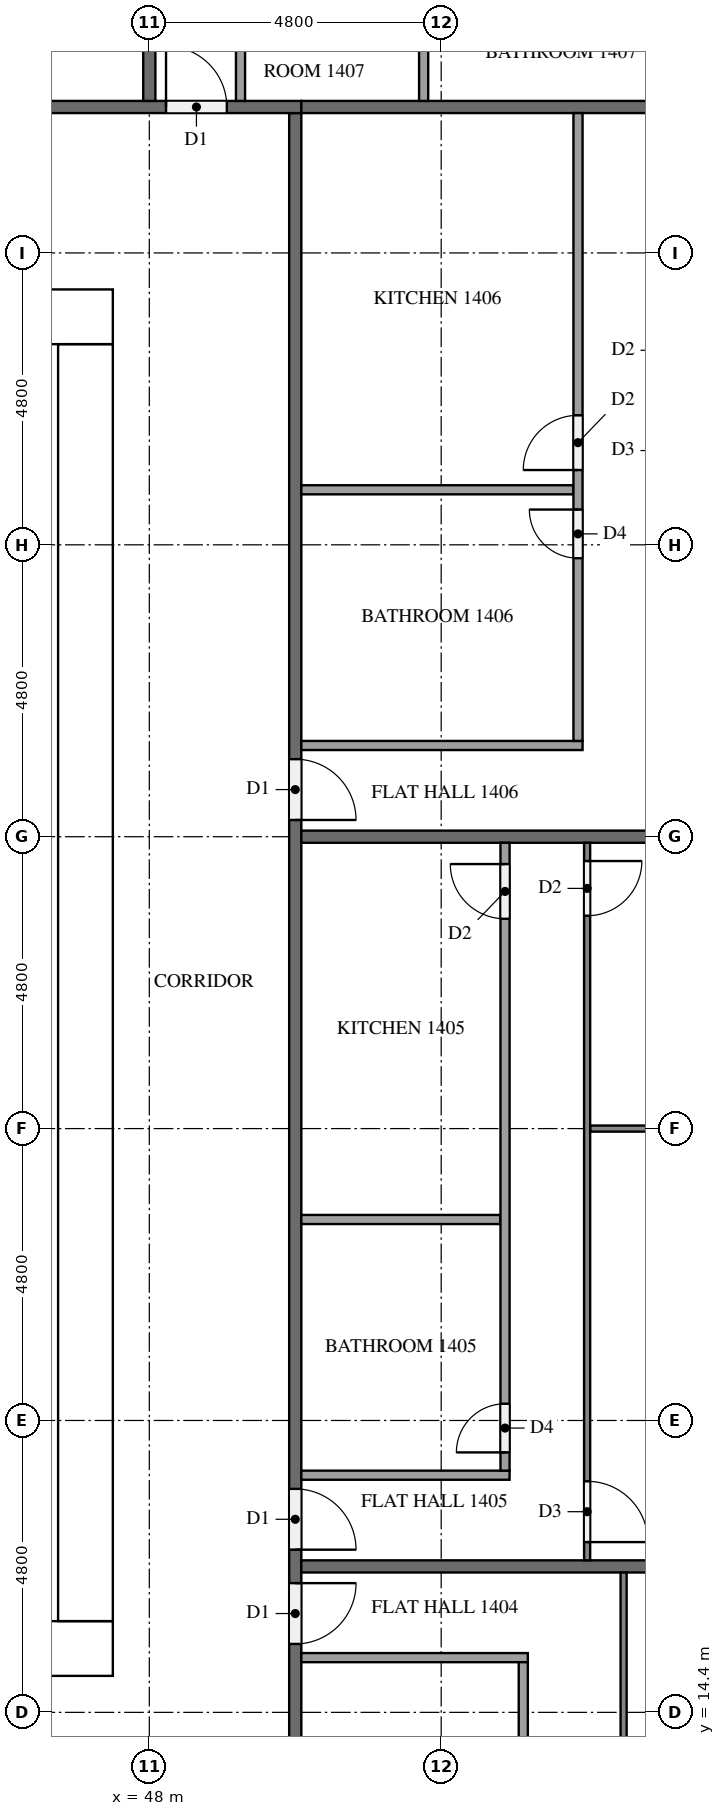
"""IFC4 building model, lengths in metres.
Left out: names, types, materials, properties, quantities, classifications, styles, units other than length and angle.
Written with IfcOpenShell. Run it as: python <this file> out.ifc"""

import sys

from ifc_helpers import new_model, si_unit, direction, frame, frame_2d, origin, place, context, subcontext, project, spatial, rectangle, extrude, element, fill, save


model = new_model("IFC4")
c1 = context("Model", 3, precision=1e-05, world=origin(), true_north=direction((0.0, 1.0)))
c2 = subcontext(c1, "Body", "Model", "MODEL_VIEW")
j1 = project(units=[si_unit("LENGTHUNIT", "METRE"), si_unit("PLANEANGLEUNIT", "RADIAN")], contexts=[c1])
p1 = place(None, origin())
s1 = spatial("IfcSite", under=j1, at=p1, CompositionType="ELEMENT")
p2 = place(p1, origin())
s2 = spatial("IfcBuilding", under=s1, at=p2, CompositionType="ELEMENT")
p3 = place(p2, frame((0.0, 0.0, 59.3)))
s3 = spatial("IfcBuildingStorey", under=s2, at=p3, CompositionType="ELEMENT", Elevation=59.3)
p4 = place(p3, frame((15.0, 15.45, 0.0), z_axis=(0.0, 0.0, 1.0), x_axis=(1.0, 0.0, 0.0)))
e1 = element("IfcWall", 1, at=p4, inside=s3, PredefinedType="SHEAR", context=c2, shape_type="SweptSolid", body=[
    extrude(rectangle(XDim=32.4, YDim=0.9, at=frame_2d((16.2, 0.0))), origin(), (0.0, 0.0, 1.0), 3.2),
])
p5 = place(p4, frame((15.3, 0.0, 0.0)))
e2 = element("IfcOpeningElement", 2, at=p5, cuts=e1, PredefinedType="OPENING", context=c2, shape_type="SweptSolid", body=[
    extrude(rectangle(XDim=1.8, YDim=2.1, at=frame_2d((0.9, 1.05))), frame((0.0, 0.46, 0.0), z_axis=(0.0, -1.0, 0.0), x_axis=(1.0, 0.0, 0.0)), (0.0, 0.0, 1.0), 0.92),
])
p6 = place(p3, frame((15.0, 37.35, 0.0), z_axis=(0.0, 0.0, 1.0), x_axis=(1.0, 0.0, 0.0)))
e3 = element("IfcWall", 3, at=p6, inside=s3, PredefinedType="SHEAR", context=c2, shape_type="SweptSolid", body=[
    extrude(rectangle(XDim=32.4, YDim=0.9, at=frame_2d((16.2, 0.0))), origin(), (0.0, 0.0, 1.0), 3.2),
])
p7 = place(p6, frame((15.3, 0.0, 0.0)))
e4 = element("IfcOpeningElement", 4, at=p7, cuts=e3, PredefinedType="OPENING", context=c2, shape_type="SweptSolid", body=[
    extrude(rectangle(XDim=1.8, YDim=2.1, at=frame_2d((0.9, 1.05))), frame((0.0, 0.46, 0.0), z_axis=(0.0, -1.0, 0.0), x_axis=(1.0, 0.0, 0.0)), (0.0, 0.0, 1.0), 0.92),
])
p8 = place(p6, frame((1.794, 0.0, 0.0)))
e5 = element("IfcOpeningElement", 5, at=p8, cuts=e3, PredefinedType="OPENING", context=c2, shape_type="SweptSolid", body=[
    extrude(rectangle(XDim=1.0, YDim=2.1, at=frame_2d((0.5, 1.05))), frame((0.0, 0.46, 0.0), z_axis=(0.0, -1.0, 0.0), x_axis=(1.0, 0.0, 0.0)), (0.0, 0.0, 1.0), 0.92),
])
p9 = place(p6, frame((5.331, 0.0, 0.0)))
e6 = element("IfcOpeningElement", 6, at=p9, cuts=e3, PredefinedType="OPENING", context=c2, shape_type="SweptSolid", body=[
    extrude(rectangle(XDim=1.0, YDim=2.1, at=frame_2d((0.5, 1.05))), frame((0.0, 0.46, 0.0), z_axis=(0.0, -1.0, 0.0), x_axis=(1.0, 0.0, 0.0)), (0.0, 0.0, 1.0), 0.92),
])
p10 = place(p3, frame((46.95, 15.9, 0.0), z_axis=(0.0, 0.0, 1.0), x_axis=(0.0, 1.0, 0.0)))
e7 = element("IfcWall", 7, at=p10, inside=s3, PredefinedType="SHEAR", context=c2, shape_type="SweptSolid", body=[
    extrude(rectangle(XDim=21.0, YDim=0.9, at=frame_2d((10.5, 0.0))), origin(), (0.0, 0.0, 1.0), 3.2),
])
p11 = place(p10, frame((10.2, 0.0, 0.0)))
e8 = element("IfcOpeningElement", 8, at=p11, cuts=e7, PredefinedType="OPENING", context=c2, shape_type="SweptSolid", body=[
    extrude(rectangle(XDim=1.2, YDim=2.1, at=frame_2d((0.6, 1.05))), frame((0.0, 0.46, 0.0), z_axis=(0.0, -1.0, 0.0), x_axis=(1.0, 0.0, 0.0)), (0.0, 0.0, 1.0), 0.92),
])
p12 = place(p3, frame((50.4, 40.7, 0.0), z_axis=(0.0, 0.0, 1.0), x_axis=(0.0, -1.0, 0.0)))
e9 = element("IfcWall", 9, at=p12, inside=s3, PredefinedType="PARTITIONING", context=c2, shape_type="SweptSolid", body=[
    extrude(rectangle(XDim=28.6, YDim=0.2, at=frame_2d((14.3, 0.0))), origin(), (0.0, 0.0, 1.0), 3.2),
])
p13 = place(p12, frame((24.175, 0.0, 0.0)))
e10 = element("IfcOpeningElement", 10, at=p13, cuts=e9, PredefinedType="OPENING", context=c2, shape_type="SweptSolid", body=[
    extrude(rectangle(XDim=1.0, YDim=2.1, at=frame_2d((0.5, 1.05))), frame((0.0, 0.11, 0.0), z_axis=(0.0, -1.0, 0.0), x_axis=(1.0, 0.0, 0.0)), (0.0, 0.0, 1.0), 0.22),
])
p14 = place(p12, frame((22.625, 0.0, 0.0)))
e11 = element("IfcOpeningElement", 11, at=p14, cuts=e9, PredefinedType="OPENING", context=c2, shape_type="SweptSolid", body=[
    extrude(rectangle(XDim=1.0, YDim=2.1, at=frame_2d((0.5, 1.05))), frame((0.0, 0.11, 0.0), z_axis=(0.0, -1.0, 0.0), x_axis=(1.0, 0.0, 0.0)), (0.0, 0.0, 1.0), 0.22),
])
p15 = place(p12, frame((10.625, 0.0, 0.0)))
e12 = element("IfcOpeningElement", 12, at=p15, cuts=e9, PredefinedType="OPENING", context=c2, shape_type="SweptSolid", body=[
    extrude(rectangle(XDim=1.0, YDim=2.1, at=frame_2d((0.5, 1.05))), frame((0.0, 0.11, 0.0), z_axis=(0.0, -1.0, 0.0), x_axis=(1.0, 0.0, 0.0)), (0.0, 0.0, 1.0), 0.22),
])
p16 = place(p3, frame((11.9, 40.8, 0.0), z_axis=(0.0, 0.0, 1.0), x_axis=(1.0, 0.0, 0.0)))
e13 = element("IfcWall", 13, at=p16, inside=s3, PredefinedType="PARTITIONING", context=c2, shape_type="SweptSolid", body=[
    extrude(rectangle(XDim=38.6, YDim=0.2, at=frame_2d((19.3, 0.0))), origin(), (0.0, 0.0, 1.0), 3.2),
])
p17 = place(p16, frame((36.375, 0.0, 0.0)))
e14 = element("IfcOpeningElement", 14, at=p17, cuts=e13, PredefinedType="OPENING", context=c2, shape_type="SweptSolid", body=[
    extrude(rectangle(XDim=1.0, YDim=2.1, at=frame_2d((0.5, 1.05))), frame((0.0, 0.11, 0.0), z_axis=(0.0, -1.0, 0.0), x_axis=(1.0, 0.0, 0.0)), (0.0, 0.0, 1.0), 0.22),
])
p18 = place(p16, frame((17.125, 0.0, 0.0)))
e15 = element("IfcOpeningElement", 15, at=p18, cuts=e13, PredefinedType="OPENING", context=c2, shape_type="SweptSolid", body=[
    extrude(rectangle(XDim=1.1, YDim=2.1, at=frame_2d((0.55, 1.05))), frame((0.0, 0.11, 0.0), z_axis=(0.0, -1.0, 0.0), x_axis=(1.0, 0.0, 0.0)), (0.0, 0.0, 1.0), 0.22),
])
p19 = place(p16, frame((15.625, 0.0, 0.0)))
e16 = element("IfcOpeningElement", 16, at=p19, cuts=e13, PredefinedType="OPENING", context=c2, shape_type="SweptSolid", body=[
    extrude(rectangle(XDim=1.0, YDim=2.1, at=frame_2d((0.5, 1.05))), frame((0.0, 0.11, 0.0), z_axis=(0.0, -1.0, 0.0), x_axis=(1.0, 0.0, 0.0)), (0.0, 0.0, 1.0), 0.22),
])
p20 = place(p16, frame((1.225, 0.0, 0.0)))
e17 = element("IfcOpeningElement", 17, at=p20, cuts=e13, PredefinedType="OPENING", context=c2, shape_type="SweptSolid", body=[
    extrude(rectangle(XDim=1.0, YDim=2.1, at=frame_2d((0.5, 1.05))), frame((0.0, 0.11, 0.0), z_axis=(0.0, -1.0, 0.0), x_axis=(1.0, 0.0, 0.0)), (0.0, 0.0, 1.0), 0.22),
])
for number, where, z_axis, x_axis in (
    (18, (50.5, 16.8, 0.0), (0.0, 0.0, 1.0), (1.0, 0.0, 0.0)),
    (19, (50.5, 28.8, 0.0), (0.0, 0.0, 1.0), (1.0, 0.0, 0.0)),
    (20, (50.5, 40.8, 0.0), (0.0, 0.0, 1.0), (1.0, 0.0, 0.0)),
):
    element("IfcWall", number, at=place(p3, frame(where, z_axis=z_axis, x_axis=x_axis)), inside=s3, PredefinedType="PARTITIONING", context=c2, shape_type="SweptSolid", body=[
        extrude(rectangle(XDim=11.8, YDim=0.2, at=frame_2d((5.9, 0.0))), origin(), (0.0, 0.0, 1.0), 3.2),
    ])
p21 = place(p3, frame((48.0, 47.575, 0.0), z_axis=(0.0, 0.0, 1.0), x_axis=(0.0, -1.0, 0.0)))
e21 = element("IfcWall", 21, at=p21, inside=s3, PredefinedType="PARTITIONING", context=c2, shape_type="SweptSolid", body=[
    extrude(rectangle(XDim=6.675, YDim=0.2, at=frame_2d((3.337, 0.0))), origin(), (0.0, 0.0, 1.0), 3.2),
])
p22 = place(p3, frame((55.8, 16.7, 0.0), z_axis=(0.0, 0.0, 1.0), x_axis=(0.0, -1.0, 0.0)))
e22 = element("IfcWall", 22, at=p22, inside=s3, PredefinedType="PARTITIONING", context=c2, shape_type="SweptSolid", body=[
    extrude(rectangle(XDim=16.6, YDim=0.1, at=frame_2d((8.3, 0.0))), origin(), (0.0, 0.0, 1.0), 3.2),
])
p23 = place(p22, frame((5.75, 0.0, 0.0)))
e23 = element("IfcOpeningElement", 23, at=p23, cuts=e22, PredefinedType="OPENING", context=c2, shape_type="SweptSolid", body=[
    extrude(rectangle(XDim=1.0, YDim=2.1, at=frame_2d((0.5, 1.05))), frame((0.0, 0.06, 0.0), z_axis=(0.0, -1.0, 0.0), x_axis=(1.0, 0.0, 0.0)), (0.0, 0.0, 1.0), 0.12),
])
p24 = place(p22, frame((7.45, 0.0, 0.0)))
e24 = element("IfcOpeningElement", 24, at=p24, cuts=e22, PredefinedType="OPENING", context=c2, shape_type="SweptSolid", body=[
    extrude(rectangle(XDim=0.9, YDim=2.1, at=frame_2d((0.45, 1.05))), frame((0.0, 0.06, 0.0), z_axis=(0.0, -1.0, 0.0), x_axis=(1.0, 0.0, 0.0)), (0.0, 0.0, 1.0), 0.12),
])
p25 = place(p22, frame((15.2, 0.0, 0.0)))
e25 = element("IfcOpeningElement", 25, at=p25, cuts=e22, PredefinedType="OPENING", context=c2, shape_type="SweptSolid", body=[
    extrude(rectangle(XDim=0.9, YDim=2.1, at=frame_2d((0.45, 1.05))), frame((0.0, 0.06, 0.0), z_axis=(0.0, -1.0, 0.0), x_axis=(1.0, 0.0, 0.0)), (0.0, 0.0, 1.0), 0.12),
])
p26 = place(p3, frame((50.5, 15.3, 0.0), z_axis=(0.0, 0.0, 1.0), x_axis=(1.0, 0.0, 0.0)))
e26 = element("IfcWall", 26, at=p26, inside=s3, PredefinedType="PARTITIONING", context=c2, shape_type="SweptSolid", body=[
    extrude(rectangle(XDim=3.725, YDim=0.15, at=frame_2d((1.863, 0.0))), origin(), (0.0, 0.0, 1.0), 3.2),
])
p27 = place(p3, frame((54.15, 0.1, 0.0), z_axis=(0.0, 0.0, 1.0), x_axis=(0.0, 1.0, 0.0)))
e27 = element("IfcWall", 27, at=p27, inside=s3, PredefinedType="PARTITIONING", context=c2, shape_type="SweptSolid", body=[
    extrude(rectangle(XDim=15.125, YDim=0.15, at=frame_2d((7.562, 0.0))), origin(), (0.0, 0.0, 1.0), 3.2),
])
p28 = place(p27, frame((10.796, 0.0, 0.0)))
e28 = element("IfcOpeningElement", 28, at=p28, cuts=e27, PredefinedType="OPENING", context=c2, shape_type="SweptSolid", body=[
    extrude(rectangle(XDim=0.9, YDim=2.1, at=frame_2d((0.45, 1.05))), frame((0.0, 0.085, 0.0), z_axis=(0.0, -1.0, 0.0), x_axis=(1.0, 0.0, 0.0)), (0.0, 0.0, 1.0), 0.17),
])
p29 = place(p27, frame((9.246, 0.0, 0.0)))
e29 = element("IfcOpeningElement", 29, at=p29, cuts=e27, PredefinedType="OPENING", context=c2, shape_type="SweptSolid", body=[
    extrude(rectangle(XDim=0.9, YDim=2.1, at=frame_2d((0.45, 1.05))), frame((0.0, 0.085, 0.0), z_axis=(0.0, -1.0, 0.0), x_axis=(1.0, 0.0, 0.0)), (0.0, 0.0, 1.0), 0.17),
])
p30 = place(p27, frame((0.35, 0.0, 0.0)))
e30 = element("IfcOpeningElement", 30, at=p30, cuts=e27, PredefinedType="OPENING", context=c2, shape_type="SweptSolid", body=[
    extrude(rectangle(XDim=0.8, YDim=2.1, at=frame_2d((0.4, 1.05))), frame((0.0, 0.085, 0.0), z_axis=(0.0, -1.0, 0.0), x_axis=(1.0, 0.0, 0.0)), (0.0, 0.0, 1.0), 0.17),
])
p31 = place(p3, frame((55.25, 24.0, 0.0), z_axis=(0.0, 0.0, 1.0), x_axis=(1.0, 0.0, 0.0)))
e31 = element("IfcWall", 31, at=p31, inside=s3, PredefinedType="PARTITIONING", context=c2, shape_type="SweptSolid", body=[
    extrude(rectangle(XDim=6.725, YDim=0.1, at=frame_2d((3.363, 0.0))), origin(), (0.0, 0.0, 1.0), 3.2),
])
p32 = place(p3, frame((55.2, 28.7, 0.0), z_axis=(0.0, 0.0, 1.0), x_axis=(0.0, -1.0, 0.0)))
e32 = element("IfcWall", 32, at=p32, inside=s3, PredefinedType="PARTITIONING", context=c2, shape_type="SweptSolid", body=[
    extrude(rectangle(XDim=11.8, YDim=0.1, at=frame_2d((5.9, 0.0))), origin(), (0.0, 0.0, 1.0), 3.2),
])
p33 = place(p32, frame((10.5, 0.0, 0.0)))
e33 = element("IfcOpeningElement", 33, at=p33, cuts=e32, PredefinedType="OPENING", context=c2, shape_type="SweptSolid", body=[
    extrude(rectangle(XDim=1.0, YDim=2.1, at=frame_2d((0.5, 1.05))), frame((0.0, 0.06, 0.0), z_axis=(0.0, -1.0, 0.0), x_axis=(1.0, 0.0, 0.0)), (0.0, 0.0, 1.0), 0.12),
])
p34 = place(p32, frame((0.3, 0.0, 0.0)))
e34 = element("IfcOpeningElement", 34, at=p34, cuts=e32, PredefinedType="OPENING", context=c2, shape_type="SweptSolid", body=[
    extrude(rectangle(XDim=0.9, YDim=2.1, at=frame_2d((0.45, 1.05))), frame((0.0, 0.06, 0.0), z_axis=(0.0, -1.0, 0.0), x_axis=(1.0, 0.0, 0.0)), (0.0, 0.0, 1.0), 0.12),
])
p35 = place(p3, frame((50.5, 22.505, 0.0), z_axis=(0.0, 0.0, 1.0), x_axis=(1.0, 0.0, 0.0)))
e35 = element("IfcWall", 35, at=p35, inside=s3, PredefinedType="PARTITIONING", context=c2, shape_type="SweptSolid", body=[
    extrude(rectangle(XDim=3.275, YDim=0.15, at=frame_2d((1.637, 0.0))), origin(), (0.0, 0.0, 1.0), 3.2),
])
p36 = place(p3, frame((50.5, 18.3, 0.0), z_axis=(0.0, 0.0, 1.0), x_axis=(1.0, 0.0, 0.0)))
e36 = element("IfcWall", 36, at=p36, inside=s3, PredefinedType="PARTITIONING", context=c2, shape_type="SweptSolid", body=[
    extrude(rectangle(XDim=3.425, YDim=0.15, at=frame_2d((1.712, 0.0))), origin(), (0.0, 0.0, 1.0), 3.2),
])
p37 = place(p3, frame((53.85, 18.375, 0.0), z_axis=(0.0, 0.0, 1.0), x_axis=(0.0, 1.0, 0.0)))
e37 = element("IfcWall", 37, at=p37, inside=s3, PredefinedType="PARTITIONING", context=c2, shape_type="SweptSolid", body=[
    extrude(rectangle(XDim=10.325, YDim=0.15, at=frame_2d((5.163, 0.0))), origin(), (0.0, 0.0, 1.0), 3.2),
])
p38 = place(p37, frame((0.3, 0.0, 0.0)))
e38 = element("IfcOpeningElement", 38, at=p38, cuts=e37, PredefinedType="OPENING", context=c2, shape_type="SweptSolid", body=[
    extrude(rectangle(XDim=0.8, YDim=2.1, at=frame_2d((0.4, 1.05))), frame((0.0, 0.085, 0.0), z_axis=(0.0, -1.0, 0.0), x_axis=(1.0, 0.0, 0.0)), (0.0, 0.0, 1.0), 0.17),
])
p39 = place(p37, frame((9.075, 0.0, 0.0)))
e39 = element("IfcOpeningElement", 39, at=p39, cuts=e37, PredefinedType="OPENING", context=c2, shape_type="SweptSolid", body=[
    extrude(rectangle(XDim=0.9, YDim=2.1, at=frame_2d((0.45, 1.05))), frame((0.0, 0.085, 0.0), z_axis=(0.0, -1.0, 0.0), x_axis=(1.0, 0.0, 0.0)), (0.0, 0.0, 1.0), 0.17),
])
p40 = place(p3, frame((50.5, 34.505, 0.0), z_axis=(0.0, 0.0, 1.0), x_axis=(1.0, 0.0, 0.0)))
e40 = element("IfcWall", 40, at=p40, inside=s3, PredefinedType="PARTITIONING", context=c2, shape_type="SweptSolid", body=[
    extrude(rectangle(XDim=4.475, YDim=0.15, at=frame_2d((2.238, 0.0))), origin(), (0.0, 0.0, 1.0), 3.2),
])
p41 = place(p3, frame((50.5, 30.3, 0.0), z_axis=(0.0, 0.0, 1.0), x_axis=(1.0, 0.0, 0.0)))
e41 = element("IfcWall", 41, at=p41, inside=s3, PredefinedType="PARTITIONING", context=c2, shape_type="SweptSolid", body=[
    extrude(rectangle(XDim=4.625, YDim=0.15, at=frame_2d((2.312, 0.0))), origin(), (0.0, 0.0, 1.0), 3.2),
])
p42 = place(p3, frame((55.05, 30.375, 0.0), z_axis=(0.0, 0.0, 1.0), x_axis=(0.0, 1.0, 0.0)))
e42 = element("IfcWall", 42, at=p42, inside=s3, PredefinedType="PARTITIONING", context=c2, shape_type="SweptSolid", body=[
    extrude(rectangle(XDim=10.325, YDim=0.15, at=frame_2d((5.163, 0.0))), origin(), (0.0, 0.0, 1.0), 3.2),
])
p43 = place(p42, frame((3.005, 0.0, 0.0)))
e43 = element("IfcOpeningElement", 43, at=p43, cuts=e42, PredefinedType="OPENING", context=c2, shape_type="SweptSolid", body=[
    extrude(rectangle(XDim=0.8, YDim=2.1, at=frame_2d((0.4, 1.05))), frame((0.0, 0.085, 0.0), z_axis=(0.0, -1.0, 0.0), x_axis=(1.0, 0.0, 0.0)), (0.0, 0.0, 1.0), 0.17),
])
p44 = place(p42, frame((4.455, 0.0, 0.0)))
e44 = element("IfcOpeningElement", 44, at=p44, cuts=e42, PredefinedType="OPENING", context=c2, shape_type="SweptSolid", body=[
    extrude(rectangle(XDim=0.9, YDim=2.1, at=frame_2d((0.45, 1.05))), frame((0.0, 0.085, 0.0), z_axis=(0.0, -1.0, 0.0), x_axis=(1.0, 0.0, 0.0)), (0.0, 0.0, 1.0), 0.17),
])
p45 = place(p3, frame((52.511, 40.9, 0.0), z_axis=(0.0, 0.0, 1.0), x_axis=(0.0, 1.0, 0.0)))
e45 = element("IfcWall", 45, at=p45, inside=s3, PredefinedType="PARTITIONING", context=c2, shape_type="SweptSolid", body=[
    extrude(rectangle(XDim=1.775, YDim=0.15, at=frame_2d((0.888, 0.0))), origin(), (0.0, 0.0, 1.0), 3.2),
])
p46 = place(p3, frame((49.5, 40.9, 0.0), z_axis=(0.0, 0.0, 1.0), x_axis=(0.0, 1.0, 0.0)))
e46 = element("IfcWall", 46, at=p46, inside=s3, PredefinedType="PARTITIONING", context=c2, shape_type="SweptSolid", body=[
    extrude(rectangle(XDim=1.925, YDim=0.15, at=frame_2d((0.962, 0.0))), origin(), (0.0, 0.0, 1.0), 3.2),
])
p47 = place(p11, origin())
e47 = element("IfcDoor", 47, at=p47, inside=s3, OperationType="SINGLE_SWING_RIGHT", PredefinedType="DOOR", context=c2, shape_type="SweptSolid", body=[
    extrude(rectangle(XDim=1.2, YDim=2.1, at=frame_2d((0.6, 1.05))), frame((0.0, 0.025, 0.0), z_axis=(0.0, -1.0, 0.0), x_axis=(1.0, 0.0, 0.0)), (0.0, 0.0, 1.0), 0.05),
])
fill(e8, e47)
p48 = place(p13, origin())
e48 = element("IfcDoor", 48, at=p48, inside=s3, OperationType="SINGLE_SWING_LEFT", PredefinedType="DOOR", context=c2, shape_type="SweptSolid", body=[
    extrude(rectangle(XDim=1.0, YDim=2.1, at=frame_2d((0.5, 1.05))), frame((0.0, 0.025, 0.0), z_axis=(0.0, -1.0, 0.0), x_axis=(1.0, 0.0, 0.0)), (0.0, 0.0, 1.0), 0.05),
])
fill(e10, e48)
p49 = place(p14, origin())
e49 = element("IfcDoor", 49, at=p49, inside=s3, OperationType="SINGLE_SWING_RIGHT", PredefinedType="DOOR", context=c2, shape_type="SweptSolid", body=[
    extrude(rectangle(XDim=1.0, YDim=2.1, at=frame_2d((0.5, 1.05))), frame((0.0, 0.025, 0.0), z_axis=(0.0, -1.0, 0.0), x_axis=(1.0, 0.0, 0.0)), (0.0, 0.0, 1.0), 0.05),
])
fill(e11, e49)
p50 = place(p15, origin())
e50 = element("IfcDoor", 50, at=p50, inside=s3, OperationType="SINGLE_SWING_RIGHT", PredefinedType="DOOR", context=c2, shape_type="SweptSolid", body=[
    extrude(rectangle(XDim=1.0, YDim=2.1, at=frame_2d((0.5, 1.05))), frame((0.0, 0.025, 0.0), z_axis=(0.0, -1.0, 0.0), x_axis=(1.0, 0.0, 0.0)), (0.0, 0.0, 1.0), 0.05),
])
fill(e12, e50)
p51 = place(p17, origin())
e51 = element("IfcDoor", 51, at=p51, inside=s3, OperationType="SINGLE_SWING_LEFT", PredefinedType="DOOR", context=c2, shape_type="SweptSolid", body=[
    extrude(rectangle(XDim=1.0, YDim=2.1, at=frame_2d((0.5, 1.05))), frame((0.0, 0.025, 0.0), z_axis=(0.0, -1.0, 0.0), x_axis=(1.0, 0.0, 0.0)), (0.0, 0.0, 1.0), 0.05),
])
fill(e14, e51)
p52 = place(p33, origin())
e52 = element("IfcDoor", 52, at=p52, inside=s3, OperationType="SINGLE_SWING_RIGHT", PredefinedType="DOOR", context=c2, shape_type="SweptSolid", body=[
    extrude(rectangle(XDim=1.0, YDim=2.1, at=frame_2d((0.5, 1.05))), frame((0.0, 0.025, 0.0), z_axis=(0.0, -1.0, 0.0), x_axis=(1.0, 0.0, 0.0)), (0.0, 0.0, 1.0), 0.05),
])
fill(e33, e52)
p53 = place(p34, origin())
e53 = element("IfcDoor", 53, at=p53, inside=s3, OperationType="SINGLE_SWING_LEFT", PredefinedType="DOOR", context=c2, shape_type="SweptSolid", body=[
    extrude(rectangle(XDim=0.9, YDim=2.1, at=frame_2d((0.45, 1.05))), frame((0.0, 0.025, 0.0), z_axis=(0.0, -1.0, 0.0), x_axis=(1.0, 0.0, 0.0)), (0.0, 0.0, 1.0), 0.05),
])
fill(e34, e53)
p54 = place(p38, origin())
e54 = element("IfcDoor", 54, at=p54, inside=s3, OperationType="SINGLE_SWING_LEFT", PredefinedType="DOOR", context=c2, shape_type="SweptSolid", body=[
    extrude(rectangle(XDim=0.8, YDim=2.1, at=frame_2d((0.4, 1.05))), frame((0.0, 0.025, 0.0), z_axis=(0.0, -1.0, 0.0), x_axis=(1.0, 0.0, 0.0)), (0.0, 0.0, 1.0), 0.05),
])
fill(e38, e54)
p55 = place(p39, origin())
e55 = element("IfcDoor", 55, at=p55, inside=s3, OperationType="SINGLE_SWING_RIGHT", PredefinedType="DOOR", context=c2, shape_type="SweptSolid", body=[
    extrude(rectangle(XDim=0.9, YDim=2.1, at=frame_2d((0.45, 1.05))), frame((0.0, 0.025, 0.0), z_axis=(0.0, -1.0, 0.0), x_axis=(1.0, 0.0, 0.0)), (0.0, 0.0, 1.0), 0.05),
])
fill(e39, e55)
p56 = place(p43, origin())
e56 = element("IfcDoor", 56, at=p56, inside=s3, OperationType="SINGLE_SWING_RIGHT", PredefinedType="DOOR", context=c2, shape_type="SweptSolid", body=[
    extrude(rectangle(XDim=0.8, YDim=2.1, at=frame_2d((0.4, 1.05))), frame((0.0, 0.025, 0.0), z_axis=(0.0, -1.0, 0.0), x_axis=(1.0, 0.0, 0.0)), (0.0, 0.0, 1.0), 0.05),
])
fill(e43, e56)
p57 = place(p44, origin())
e57 = element("IfcDoor", 57, at=p57, inside=s3, OperationType="SINGLE_SWING_LEFT", PredefinedType="DOOR", context=c2, shape_type="SweptSolid", body=[
    extrude(rectangle(XDim=0.9, YDim=2.1, at=frame_2d((0.45, 1.05))), frame((0.0, 0.025, 0.0), z_axis=(0.0, -1.0, 0.0), x_axis=(1.0, 0.0, 0.0)), (0.0, 0.0, 1.0), 0.05),
])
fill(e44, e57)
save(model, sys.argv[1])
